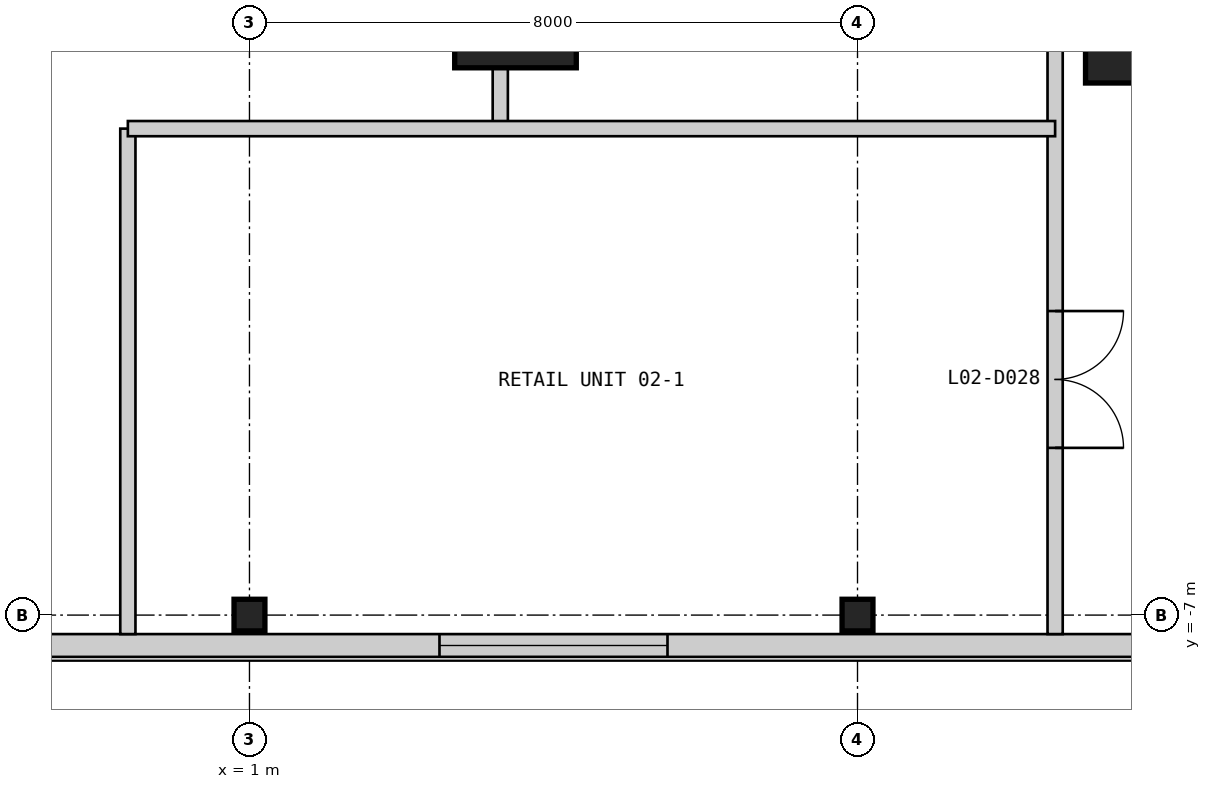
"""IFC4 building model, lengths in metres.
Left out: names, types, materials, properties, quantities, classifications, styles, units other than length and angle.
Written with IfcOpenShell. Run it as: python <this file> out.ifc"""

import sys

from ifc_helpers import new_model, si_unit, direction, frame, frame_2d, origin, origin_2d, place, context, subcontext, project, spatial, rectangle, i_section, extrude, element, fill, save


model = new_model("IFC4")
c1 = context("Model", 3, precision=1e-05, world=origin(), true_north=direction((0.0, 1.0)))
c2 = subcontext(c1, "Body", "Model", "MODEL_VIEW")
j1 = project(units=[si_unit("LENGTHUNIT", "METRE"), si_unit("PLANEANGLEUNIT", "RADIAN")], contexts=[c1])
p1 = place(None, origin())
s1 = spatial("IfcSite", under=j1, at=p1, CompositionType="ELEMENT")
p2 = place(p1, origin())
s2 = spatial("IfcBuilding", under=s1, at=p2, CompositionType="ELEMENT")
p3 = place(p2, frame((0.0, 0.0, 11.8)))
s3 = spatial("IfcBuildingStorey", under=s2, at=p3, CompositionType="ELEMENT", Elevation=11.8)
p4 = place(p3, frame((4.5, 1.0, 0.0), z_axis=(0.0, 0.0, 1.0), x_axis=(1.0, 0.0, 0.0)))
e1 = element("IfcColumn", 1, at=p4, inside=s3, PredefinedType="COLUMN", context=c2, shape_type="SweptSolid", body=[
    extrude(rectangle(XDim=1.6, YDim=1.6, at=origin_2d()), origin(), (0.0, 0.0, 1.0), 4.8),
])
p5 = place(p3, frame((13.0, 1.0, 0.0), z_axis=(0.0, 0.0, 1.0), x_axis=(1.0, 0.0, 0.0)))
e2 = element("IfcColumn", 2, at=p5, inside=s3, PredefinedType="COLUMN", context=c2, shape_type="SweptSolid", body=[
    extrude(rectangle(XDim=2.0, YDim=2.0, at=origin_2d()), origin(), (0.0, 0.0, 1.0), 4.8),
])
for number, where, z_axis, x_axis in (
    (3, (1.0, -7.0, 0.0), (0.0, 0.0, 1.0), (1.0, 0.0, 0.0)),
    (4, (9.0, -7.0, 0.0), (0.0, 0.0, 1.0), (1.0, 0.0, 0.0)),
):
    element("IfcColumn", number, at=place(p3, frame(where, z_axis=z_axis, x_axis=x_axis)), inside=s3, PredefinedType="COLUMN", context=c2, shape_type="SweptSolid", body=[
        extrude(i_section(OverallWidth=0.406, OverallDepth=0.417, WebThickness=0.03, FlangeThickness=0.048, at=origin_2d()), origin(), (0.0, 0.0, 1.0), 4.8),
    ])
p6 = place(p3, frame((-15.55, -7.4, 0.0), z_axis=(0.0, 0.0, 1.0), x_axis=(1.0, 0.0, 0.0)))
e5 = element("IfcWall", 5, at=p6, inside=s3, PredefinedType="SOLIDWALL", context=c2, shape_type="SweptSolid", body=[
    extrude(rectangle(XDim=73.1, YDim=0.3, at=frame_2d((36.55, 0.0))), origin(), (0.0, 0.0, 1.0), 4.5),
])
p7 = place(p6, frame((11.65, 0.0, 0.0)))
e6 = element("IfcOpeningElement", 6, at=p7, cuts=e5, PredefinedType="OPENING", context=c2, shape_type="SweptSolid", body=[
    extrude(rectangle(XDim=1.8, YDim=2.4, at=frame_2d((0.9, 1.2))), frame((0.0, 0.16, 0.0), z_axis=(0.0, -1.0, 0.0), x_axis=(1.0, 0.0, 0.0)), (0.0, 0.0, 1.0), 0.32),
])
p8 = place(p6, frame((45.65, 0.0, 0.0)))
e7 = element("IfcOpeningElement", 7, at=p8, cuts=e5, PredefinedType="OPENING", context=c2, shape_type="SweptSolid", body=[
    extrude(rectangle(XDim=1.8, YDim=2.4, at=frame_2d((0.9, 1.2))), frame((0.0, 0.16, 0.0), z_axis=(0.0, -1.0, 0.0), x_axis=(1.0, 0.0, 0.0)), (0.0, 0.0, 1.0), 0.32),
])
p9 = place(p6, frame((3.05, 0.0, 0.9)))
e8 = element("IfcOpeningElement", 8, at=p9, cuts=e5, PredefinedType="OPENING", context=c2, shape_type="SweptSolid", body=[
    extrude(rectangle(XDim=3.0, YDim=2.4, at=frame_2d((1.5, 1.2))), frame((0.0, 0.16, 0.0), z_axis=(0.0, -1.0, 0.0), x_axis=(1.0, 0.0, 0.0)), (0.0, 0.0, 1.0), 0.32),
])
p10 = place(p6, frame((19.05, 0.0, 0.9)))
e9 = element("IfcOpeningElement", 9, at=p10, cuts=e5, PredefinedType="OPENING", context=c2, shape_type="SweptSolid", body=[
    extrude(rectangle(XDim=3.0, YDim=2.4, at=frame_2d((1.5, 1.2))), frame((0.0, 0.16, 0.0), z_axis=(0.0, -1.0, 0.0), x_axis=(1.0, 0.0, 0.0)), (0.0, 0.0, 1.0), 0.32),
])
p11 = place(p6, frame((33.05, 0.0, 0.9)))
e10 = element("IfcOpeningElement", 10, at=p11, cuts=e5, PredefinedType="OPENING", context=c2, shape_type="SweptSolid", body=[
    extrude(rectangle(XDim=3.0, YDim=2.4, at=frame_2d((1.5, 1.2))), frame((0.0, 0.16, 0.0), z_axis=(0.0, -1.0, 0.0), x_axis=(1.0, 0.0, 0.0)), (0.0, 0.0, 1.0), 0.32),
])
p12 = place(p6, frame((53.55, 0.0, 0.9)))
e11 = element("IfcOpeningElement", 11, at=p12, cuts=e5, PredefinedType="OPENING", context=c2, shape_type="SweptSolid", body=[
    extrude(rectangle(XDim=3.0, YDim=2.4, at=frame_2d((1.5, 1.2))), frame((0.0, 0.16, 0.0), z_axis=(0.0, -1.0, 0.0), x_axis=(1.0, 0.0, 0.0)), (0.0, 0.0, 1.0), 0.32),
])
p13 = place(p6, frame((59.55, 0.0, 0.9)))
e12 = element("IfcOpeningElement", 12, at=p13, cuts=e5, PredefinedType="OPENING", context=c2, shape_type="SweptSolid", body=[
    extrude(rectangle(XDim=3.0, YDim=2.4, at=frame_2d((1.5, 1.2))), frame((0.0, 0.16, 0.0), z_axis=(0.0, -1.0, 0.0), x_axis=(1.0, 0.0, 0.0)), (0.0, 0.0, 1.0), 0.32),
])
p14 = place(p6, frame((67.05, 0.0, 0.9)))
e13 = element("IfcOpeningElement", 13, at=p14, cuts=e5, PredefinedType="OPENING", context=c2, shape_type="SweptSolid", body=[
    extrude(rectangle(XDim=3.0, YDim=2.4, at=frame_2d((1.5, 1.2))), frame((0.0, 0.16, 0.0), z_axis=(0.0, -1.0, 0.0), x_axis=(1.0, 0.0, 0.0)), (0.0, 0.0, 1.0), 0.32),
])
p15 = place(p3, frame((-0.6, -7.25, 0.0), z_axis=(0.0, 0.0, 1.0), x_axis=(0.0, 1.0, 0.0)))
e14 = element("IfcWall", 14, at=p15, inside=s3, PredefinedType="PARTITIONING", context=c2, shape_type="SweptSolid", body=[
    extrude(rectangle(XDim=6.65, YDim=0.2, at=frame_2d((3.325, 0.0))), origin(), (0.0, 0.0, 1.0), 4.5),
])
p16 = place(p3, frame((4.3, -0.6, 0.0), z_axis=(0.0, 0.0, 1.0), x_axis=(0.0, 1.0, 0.0)))
e15 = element("IfcWall", 15, at=p16, inside=s3, PredefinedType="PARTITIONING", context=c2, shape_type="SweptSolid", body=[
    extrude(rectangle(XDim=0.8, YDim=0.2, at=frame_2d((0.4, 0.0))), origin(), (0.0, 0.0, 1.0), 4.5),
])
p17 = place(p3, frame((11.6, -7.25, 0.0), z_axis=(0.0, 0.0, 1.0), x_axis=(0.0, 1.0, 0.0)))
e16 = element("IfcWall", 16, at=p17, inside=s3, PredefinedType="PARTITIONING", context=c2, shape_type="SweptSolid", body=[
    extrude(rectangle(XDim=14.25, YDim=0.2, at=frame_2d((7.125, 0.0))), origin(), (0.0, 0.0, 1.0), 4.5),
])
p18 = place(p17, frame((2.45, 0.0, 0.0)))
e17 = element("IfcOpeningElement", 17, at=p18, cuts=e16, PredefinedType="OPENING", context=c2, shape_type="SweptSolid", body=[
    extrude(rectangle(XDim=1.8, YDim=2.4, at=frame_2d((0.9, 1.2))), frame((0.0, 0.11, 0.0), z_axis=(0.0, -1.0, 0.0), x_axis=(1.0, 0.0, 0.0)), (0.0, 0.0, 1.0), 0.22),
])
p19 = place(p17, frame((9.525, 0.0, 0.0)))
e18 = element("IfcOpeningElement", 18, at=p19, cuts=e16, PredefinedType="OPENING", context=c2, shape_type="SweptSolid", body=[
    extrude(rectangle(XDim=1.8, YDim=2.4, at=frame_2d((0.9, 1.2))), frame((0.0, 0.11, 0.0), z_axis=(0.0, -1.0, 0.0), x_axis=(1.0, 0.0, 0.0)), (0.0, 0.0, 1.0), 0.22),
])
p20 = place(p3, frame((-0.6, -0.6, 0.0), z_axis=(0.0, 0.0, 1.0), x_axis=(1.0, 0.0, 0.0)))
e19 = element("IfcWall", 19, at=p20, inside=s3, PredefinedType="PARTITIONING", context=c2, shape_type="SweptSolid", body=[
    extrude(rectangle(XDim=12.2, YDim=0.2, at=frame_2d((6.1, 0.0))), origin(), (0.0, 0.0, 1.0), 4.5),
])
p21 = place(p10, origin())
e20 = element("IfcWindow", 20, at=p21, inside=s3, PartitioningType="SINGLE_PANEL", PredefinedType="WINDOW", context=c2, shape_type="SweptSolid", body=[
    extrude(rectangle(XDim=3.0, YDim=2.4, at=frame_2d((1.5, 1.2))), frame((0.0, 0.03, 0.0), z_axis=(0.0, -1.0, 0.0), x_axis=(1.0, 0.0, 0.0)), (0.0, 0.0, 1.0), 0.06),
])
fill(e9, e20)
p22 = place(p18, frame((1.8, 0.0, 0.0), z_axis=(0.0, 0.0, 1.0), x_axis=(-1.0, 0.0, 0.0)))
e21 = element("IfcDoor", 21, at=p22, inside=s3, OperationType="DOUBLE_DOOR_SINGLE_SWING", PredefinedType="DOOR", context=c2, shape_type="SweptSolid", body=[
    extrude(rectangle(XDim=1.8, YDim=2.4, at=frame_2d((0.9, 1.2))), frame((0.0, 0.025, 0.0), z_axis=(0.0, -1.0, 0.0), x_axis=(1.0, 0.0, 0.0)), (0.0, 0.0, 1.0), 0.05),
])
fill(e17, e21)
save(model, sys.argv[1])
